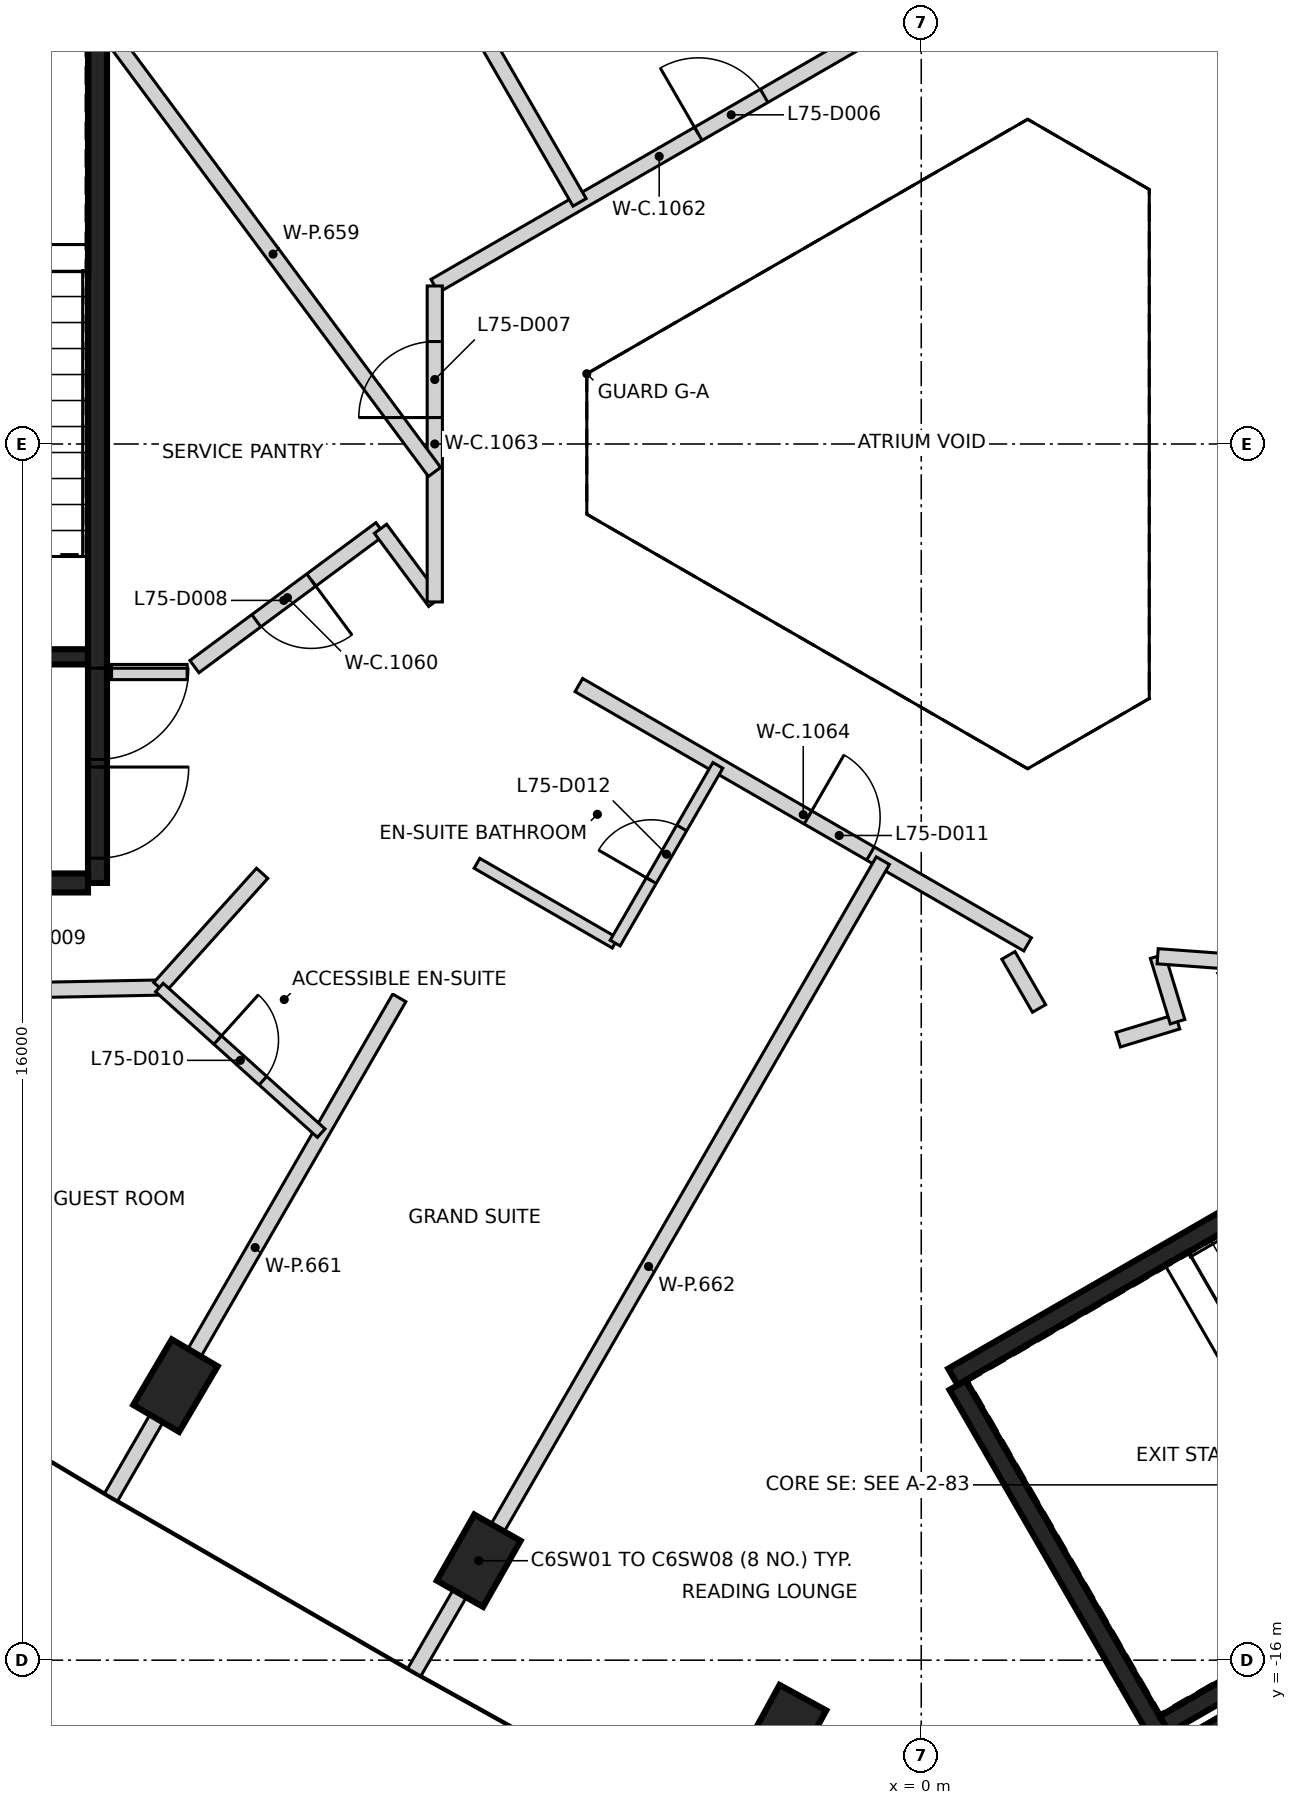
"""IFC4 building model, lengths in metres.
Left out: names, types, materials, properties, quantities, classifications, styles, units other than length and angle.
Written with IfcOpenShell. Run it as: python <this file> out.ifc"""

import sys

from ifc_helpers import new_model, si_unit, direction, frame, frame_2d, origin, origin_2d, place, context, subcontext, project, spatial, rectangle, extrude, element, fill, save


model = new_model("IFC4")
c1 = context("Model", 3, precision=1e-05, world=origin(), true_north=direction((0.0, 1.0)))
c2 = subcontext(c1, "Body", "Model", "MODEL_VIEW")
j1 = project(units=[si_unit("LENGTHUNIT", "METRE"), si_unit("PLANEANGLEUNIT", "RADIAN")], contexts=[c1])
p1 = place(None, origin())
s1 = spatial("IfcSite", under=j1, at=p1, CompositionType="ELEMENT")
p2 = place(p1, origin())
s2 = spatial("IfcBuilding", under=s1, at=p2, CompositionType="ELEMENT")
p3 = place(p2, frame((0.0, 0.0, 298.2)))
s3 = spatial("IfcBuildingStorey", under=s2, at=p3, CompositionType="ELEMENT", Elevation=298.2)
for number, where, z_axis, x_axis in (
    (1, (-9.812, -12.388, -0.35), (0.0, 0.0, 1.0), (0.507, 0.862, 0.0)),
    (2, (-5.822, -14.691, -0.35), (0.0, 0.0, 1.0), (0.493, 0.87, 0.0)),
    (3, (-1.797, -16.932, -0.35), (0.0, 0.0, 1.0), (0.479, 0.878, 0.0)),
):
    element("IfcColumn", number, at=place(p3, frame(where, z_axis=z_axis, x_axis=x_axis)), inside=s3, PredefinedType="COLUMN", context=c2, shape_type="SweptSolid", body=[
        extrude(rectangle(XDim=1.0, YDim=0.7, at=origin_2d()), origin(), (0.0, 0.0, 1.0), 2.64),
    ])
p4 = place(p3, frame((-10.837, 5.775, 0.0), z_axis=(0.0, 0.0, 1.0), x_axis=(0.0, -1.0, 0.0)))
e4 = element("IfcWall", 4, at=p4, inside=s3, PredefinedType="SHEAR", context=c2, shape_type="SweptSolid", body=[
    extrude(rectangle(XDim=11.55, YDim=0.25, at=frame_2d((5.775, 0.0))), origin(), (0.0, 0.0, 1.0), 3.2),
])
p5 = place(p4, frame((10.025, 0.0, 0.0)))
e5 = element("IfcOpeningElement", 5, at=p5, cuts=e4, PredefinedType="OPENING", context=c2, shape_type="SweptSolid", body=[
    extrude(rectangle(XDim=1.2, YDim=2.1, at=frame_2d((0.6, 1.05))), frame((0.0, 0.135, 0.0), z_axis=(0.0, -1.0, 0.0), x_axis=(1.0, 0.0, 0.0)), (0.0, 0.0, 1.0), 0.27),
])
p6 = place(p4, frame((8.725, 0.0, 0.0)))
e6 = element("IfcOpeningElement", 6, at=p6, cuts=e4, PredefinedType="OPENING", context=c2, shape_type="SweptSolid", body=[
    extrude(rectangle(XDim=1.2, YDim=2.1, at=frame_2d((0.6, 1.05))), frame((0.0, 0.135, 0.0), z_axis=(0.0, -1.0, 0.0), x_axis=(1.0, 0.0, 0.0)), (0.0, 0.0, 1.0), 0.27),
])
p7 = place(p3, frame((-10.963, -5.775, 0.0), z_axis=(0.0, 0.0, 1.0), x_axis=(-1.0, 0.0, 0.0)))
e7 = element("IfcWall", 7, at=p7, inside=s3, PredefinedType="SHEAR", context=c2, shape_type="SweptSolid", body=[
    extrude(rectangle(XDim=5.225, YDim=0.25, at=frame_2d((2.612, 0.0))), origin(), (0.0, 0.0, 1.0), 3.2),
])
p8 = place(p3, frame((-10.963, -2.8, 0.0), z_axis=(0.0, 0.0, 1.0), x_axis=(-1.0, 0.0, 0.0)))
e8 = element("IfcWall", 8, at=p8, inside=s3, PredefinedType="SHEAR", context=c2, shape_type="SweptSolid", body=[
    extrude(rectangle(XDim=5.098, YDim=0.2, at=frame_2d((2.549, 0.0))), origin(), (0.0, 0.0, 1.0), 3.2),
])
p9 = place(p8, frame((1.774, 0.0, 0.0)))
e9 = element("IfcOpeningElement", 9, at=p9, cuts=e8, PredefinedType="OPENING", context=c2, shape_type="SweptSolid", body=[
    extrude(rectangle(XDim=1.4, YDim=2.1, at=frame_2d((0.7, 1.05))), frame((0.0, 0.11, 0.0), z_axis=(0.0, -1.0, 0.0), x_axis=(1.0, 0.0, 0.0)), (0.0, 0.0, 1.0), 0.22),
])
p10 = place(p3, frame((0.417, -12.273, 0.0), z_axis=(0.0, 0.0, 1.0), x_axis=(0.866021906294, 0.500006057782, 0.0)))
e10 = element("IfcWall", 10, at=p10, inside=s3, PredefinedType="SHEAR", context=c2, shape_type="SweptSolid", body=[
    extrude(rectangle(XDim=11.55, YDim=0.25, at=frame_2d((5.775, 0.0))), origin(), (0.0, 0.0, 1.0), 3.2),
])
p11 = place(p10, frame((10.025, 0.0, 0.0)))
e11 = element("IfcOpeningElement", 11, at=p11, cuts=e10, PredefinedType="OPENING", context=c2, shape_type="SweptSolid", body=[
    extrude(rectangle(XDim=1.2, YDim=2.1, at=frame_2d((0.6, 1.05))), frame((0.0, 0.135, 0.0), z_axis=(0.0, -1.0, 0.0), x_axis=(1.0, 0.0, 0.0)), (0.0, 0.0, 1.0), 0.27),
])
p12 = place(p10, frame((8.725, 0.0, 0.0)))
e12 = element("IfcOpeningElement", 12, at=p12, cuts=e10, PredefinedType="OPENING", context=c2, shape_type="SweptSolid", body=[
    extrude(rectangle(XDim=1.2, YDim=2.1, at=frame_2d((0.6, 1.05))), frame((0.0, 0.135, 0.0), z_axis=(0.0, -1.0, 0.0), x_axis=(1.0, 0.0, 0.0)), (0.0, 0.0, 1.0), 0.27),
])
p13 = place(p3, frame((3.235, -17.153, 0.0), z_axis=(0.0, 0.0, 1.0), x_axis=(-0.500008851346, 0.866020293397, 0.0)))
e13 = element("IfcWall", 13, at=p13, inside=s3, PredefinedType="SHEAR", context=c2, shape_type="SweptSolid", body=[
    extrude(rectangle(XDim=5.51, YDim=0.25, at=frame_2d((2.755, 0.0))), origin(), (0.0, 0.0, 1.0), 3.2),
])
p14 = place(p3, frame((1.669, -18.19, 0.0), z_axis=(0.0, 0.0, 1.0), x_axis=(0.866042235819, 0.499970844928, 0.0)))
e14 = element("IfcWall", 14, at=p14, inside=s3, PredefinedType="SHEAR", context=c2, shape_type="SweptSolid", body=[
    extrude(rectangle(XDim=2.865, YDim=0.25, at=frame_2d((1.432, 0.0))), origin(), (0.0, 0.0, 1.0), 3.2),
])
p15 = place(p3, frame((5.431, -15.556, 0.0), z_axis=(0.0, 0.0, 1.0), x_axis=(-0.866022940537, -0.500004266446, 0.0)))
e15 = element("IfcWall", 15, at=p15, inside=s3, PredefinedType="SHEAR", context=c2, shape_type="SweptSolid", body=[
    extrude(rectangle(XDim=2.575, YDim=0.25, at=frame_2d((1.287, 0.0))), origin(), (0.0, 0.0, 1.0), 3.2),
])
p16 = place(p3, frame((-16.732, -7.282, 0.0), z_axis=(0.0, 0.0, 1.0), x_axis=(0.999809119854, 0.019537754635, 0.0)))
e16 = element("IfcWall", 16, at=p16, inside=s3, PredefinedType="PARTITIONING", context=c2, shape_type="SweptSolid", body=[
    extrude(rectangle(XDim=6.71, YDim=0.2, at=frame_2d((3.355, 0.0))), origin(), (0.0, 0.0, 1.0), 3.2),
])
p17 = place(p16, frame((3.451, 0.0, 0.0)))
e17 = element("IfcOpeningElement", 17, at=p17, cuts=e16, PredefinedType="OPENING", context=c2, shape_type="SweptSolid", body=[
    extrude(rectangle(XDim=1.0, YDim=2.1, at=frame_2d((0.5, 1.05))), frame((0.0, 0.11, 0.0), z_axis=(0.0, -1.0, 0.0), x_axis=(1.0, 0.0, 0.0)), (0.0, 0.0, 1.0), 0.22),
])
p18 = place(p3, frame((-10.652, -3.0, 0.0), z_axis=(0.0, 0.0, 1.0), x_axis=(1.0, 0.0, 0.0)))
e18 = element("IfcWall", 18, at=p18, inside=s3, PredefinedType="PARTITIONING", context=c2, shape_type="SweptSolid", body=[
    extrude(rectangle(XDim=0.994, YDim=0.2, at=frame_2d((0.497, 0.0))), origin(), (0.0, 0.0, 1.0), 3.2),
])
p19 = place(p3, frame((-10.023, -7.151, 0.0), z_axis=(0.0, 0.0, 1.0), x_axis=(0.668804583793, 0.743438248073, 0.0)))
e19 = element("IfcWall", 19, at=p19, inside=s3, PredefinedType="PARTITIONING", context=c2, shape_type="SweptSolid", body=[
    extrude(rectangle(XDim=2.021, YDim=0.2, at=frame_2d((1.011, 0.0))), origin(), (0.0, 0.0, 1.0), 3.2),
])
p20 = place(p3, frame((-7.115, -1.115, 0.0), z_axis=(0.0, 0.0, 1.0), x_axis=(-0.803344165632, -0.595515030495, 0.0)))
e20 = element("IfcWall", 20, at=p20, inside=s3, PredefinedType="PARTITIONING", context=c2, shape_type="SweptSolid", body=[
    extrude(rectangle(XDim=3.046, YDim=0.2, at=frame_2d((1.523, 0.0))), origin(), (0.0, 0.0, 1.0), 3.2),
])
p21 = place(p20, frame((1.133, 0.0, 0.0)))
e21 = element("IfcOpeningElement", 21, at=p21, cuts=e20, PredefinedType="OPENING", context=c2, shape_type="SweptSolid", body=[
    extrude(rectangle(XDim=0.9, YDim=2.1, at=frame_2d((0.45, 1.05))), frame((0.0, 0.11, 0.0), z_axis=(0.0, -1.0, 0.0), x_axis=(1.0, 0.0, 0.0)), (0.0, 0.0, 1.0), 0.22),
])
p22 = place(p3, frame((-7.114, -1.115, 0.0), z_axis=(0.0, 0.0, 1.0), x_axis=(0.595690139668, -0.803214328496, 0.0)))
e22 = element("IfcWall", 22, at=p22, inside=s3, PredefinedType="PARTITIONING", context=c2, shape_type="SweptSolid", body=[
    extrude(rectangle(XDim=1.199, YDim=0.2, at=frame_2d((0.599, 0.0))), origin(), (0.0, 0.0, 1.0), 3.2),
])
p23 = place(p3, frame((-6.4, 2.079, 0.0), z_axis=(0.0, 0.0, 1.0), x_axis=(0.866037708501, 0.499978687001, 0.0)))
e23 = element("IfcWall", 23, at=p23, inside=s3, PredefinedType="PARTITIONING", context=c2, shape_type="SweptSolid", body=[
    extrude(rectangle(XDim=6.818, YDim=0.2, at=frame_2d((3.409, 0.0))), origin(), (0.0, 0.0, 1.0), 3.2),
])
p24 = place(p23, frame((4.003, 0.0, 0.0)))
e24 = element("IfcOpeningElement", 24, at=p24, cuts=e23, PredefinedType="OPENING", context=c2, shape_type="SweptSolid", body=[
    extrude(rectangle(XDim=1.0, YDim=2.1, at=frame_2d((0.5, 1.05))), frame((0.0, 0.11, 0.0), z_axis=(0.0, -1.0, 0.0), x_axis=(1.0, 0.0, 0.0)), (0.0, 0.0, 1.0), 0.22),
])
p25 = place(p3, frame((-6.4, -2.078, 0.0), z_axis=(0.0, 0.0, 1.0), x_axis=(0.0, 1.0, 0.0)))
e25 = element("IfcWall", 25, at=p25, inside=s3, PredefinedType="PARTITIONING", context=c2, shape_type="SweptSolid", body=[
    extrude(rectangle(XDim=4.157, YDim=0.2, at=frame_2d((2.079, 0.0))), origin(), (0.0, 0.0, 1.0), 3.2),
])
p26 = place(p25, frame((2.426, 0.0, 0.0)))
e26 = element("IfcOpeningElement", 26, at=p26, cuts=e25, PredefinedType="OPENING", context=c2, shape_type="SweptSolid", body=[
    extrude(rectangle(XDim=1.0, YDim=2.1, at=frame_2d((0.5, 1.05))), frame((0.0, 0.11, 0.0), z_axis=(0.0, -1.0, 0.0), x_axis=(1.0, 0.0, 0.0)), (0.0, 0.0, 1.0), 0.22),
])
p27 = place(p3, frame((-4.505, -3.171, 0.0), z_axis=(0.0, 0.0, 1.0), x_axis=(0.865849219471, -0.500305036094, 0.0)))
e27 = element("IfcWall", 27, at=p27, inside=s3, PredefinedType="PARTITIONING", context=c2, shape_type="SweptSolid", body=[
    extrude(rectangle(XDim=6.819, YDim=0.2, at=frame_2d((3.41, 0.0))), origin(), (0.0, 0.0, 1.0), 3.2),
])
p28 = place(p27, frame((3.481, 0.0, 0.0)))
e28 = element("IfcOpeningElement", 28, at=p28, cuts=e27, PredefinedType="OPENING", context=c2, shape_type="SweptSolid", body=[
    extrude(rectangle(XDim=0.95, YDim=2.1, at=frame_2d((0.475, 1.05))), frame((0.0, 0.11, 0.0), z_axis=(0.0, -1.0, 0.0), x_axis=(1.0, 0.0, 0.0)), (0.0, 0.0, 1.0), 0.22),
])
p29 = place(p3, frame((1.147, -6.728, 0.0), z_axis=(0.0, 0.0, 1.0), x_axis=(0.500080775649, -0.865978762919, 0.0)))
e29 = element("IfcWall", 29, at=p29, inside=s3, PredefinedType="PARTITIONING", context=c2, shape_type="SweptSolid", body=[
    extrude(rectangle(XDim=0.806, YDim=0.2, at=frame_2d((0.403, 0.0))), origin(), (0.0, 0.0, 1.0), 3.2),
])
p30 = place(p3, frame((2.591, -7.837, 0.0), z_axis=(0.0, 0.0, 1.0), x_axis=(0.956974070788, 0.290173444409, 0.0)))
e30 = element("IfcWall", 30, at=p30, inside=s3, PredefinedType="PARTITIONING", context=c2, shape_type="SweptSolid", body=[
    extrude(rectangle(XDim=0.816, YDim=0.2, at=frame_2d((0.408, 0.0))), origin(), (0.0, 0.0, 1.0), 3.2),
])
p31 = place(p3, frame((3.11, -6.739, 0.0), z_axis=(0.0, 0.0, 1.0), x_axis=(0.291053676179, -0.95670672496, 0.0)))
e31 = element("IfcWall", 31, at=p31, inside=s3, PredefinedType="PARTITIONING", context=c2, shape_type="SweptSolid", body=[
    extrude(rectangle(XDim=0.9, YDim=0.2, at=frame_2d((0.45, 0.0))), origin(), (0.0, 0.0, 1.0), 3.2),
])
p32 = place(p3, frame((3.11, -6.739, 0.0), z_axis=(0.0, 0.0, 1.0), x_axis=(0.997306047238, -0.073352901386, 0.0)))
e32 = element("IfcWall", 32, at=p32, inside=s3, PredefinedType="PARTITIONING", context=c2, shape_type="SweptSolid", body=[
    extrude(rectangle(XDim=0.832, YDim=0.2, at=frame_2d((0.416, 0.0))), origin(), (0.0, 0.0, 1.0), 3.2),
])
p33 = place(p3, frame((-10.652, 5.364, 0.0), z_axis=(0.0, 0.0, 1.0), x_axis=(0.595550732464, -0.803317698711, 0.0)))
e33 = element("IfcWall", 33, at=p33, inside=s3, PredefinedType="PARTITIONING", context=c2, shape_type="SweptSolid", body=[
    extrude(rectangle(XDim=7.135, YDim=0.2, at=frame_2d((3.567, 0.0))), origin(), (0.0, 0.0, 1.0), 3.2),
])
p34 = place(p3, frame((-10.659, 13.856, 0.0), z_axis=(0.0, 0.0, 1.0), x_axis=(0.500004723409, -0.866022676706, 0.0)))
e34 = element("IfcWall", 34, at=p34, inside=s3, PredefinedType="PARTITIONING", context=c2, shape_type="SweptSolid", body=[
    extrude(rectangle(XDim=12.329, YDim=0.2, at=frame_2d((6.164, 0.0))), origin(), (0.0, 0.0, 1.0), 3.2),
])
p35 = place(p3, frame((-10.659, -13.856, 0.0), z_axis=(0.0, 0.0, 1.0), x_axis=(0.49995742368, 0.866049983839, 0.0)))
e35 = element("IfcWall", 35, at=p35, inside=s3, PredefinedType="PARTITIONING", context=c2, shape_type="SweptSolid", body=[
    extrude(rectangle(XDim=7.585, YDim=0.2, at=frame_2d((3.792, 0.0))), origin(), (0.0, 0.0, 1.0), 3.2),
])
p36 = place(p3, frame((-6.67, -16.159, 0.0), z_axis=(0.0, 0.0, 1.0), x_axis=(0.500017276951, 0.866015428702, 0.0)))
e36 = element("IfcWall", 36, at=p36, inside=s3, PredefinedType="PARTITIONING", context=c2, shape_type="SweptSolid", body=[
    extrude(rectangle(XDim=12.329, YDim=0.2, at=frame_2d((6.165, 0.0))), origin(), (0.0, 0.0, 1.0), 3.2),
])
p37 = place(p3, frame((-10.023, -7.151, 0.0), z_axis=(0.0, 0.0, 1.0), x_axis=(0.743463699468, -0.668776291127, 0.0)))
e37 = element("IfcWall", 37, at=p37, inside=s3, PredefinedType="PARTITIONING", context=c2, shape_type="SweptSolid", body=[
    extrude(rectangle(XDim=2.864, YDim=0.15, at=frame_2d((1.432, 0.0))), origin(), (0.0, 0.0, 1.0), 3.2),
])
p38 = place(p37, frame((1.032, 0.0, 0.0)))
e38 = element("IfcOpeningElement", 38, at=p38, cuts=e37, PredefinedType="OPENING", context=c2, shape_type="SweptSolid", body=[
    extrude(rectangle(XDim=0.8, YDim=2.1, at=frame_2d((0.4, 1.05))), frame((0.0, 0.085, 0.0), z_axis=(0.0, -1.0, 0.0), x_axis=(1.0, 0.0, 0.0)), (0.0, 0.0, 1.0), 0.17),
])
p39 = place(p3, frame((-5.845, -5.516, 0.0), z_axis=(0.0, 0.0, 1.0), x_axis=(0.865972526687, -0.500091574638, 0.0)))
e39 = element("IfcWall", 39, at=p39, inside=s3, PredefinedType="PARTITIONING", context=c2, shape_type="SweptSolid", body=[
    extrude(rectangle(XDim=2.099, YDim=0.15, at=frame_2d((1.05, 0.0))), origin(), (0.0, 0.0, 1.0), 3.2),
])
p40 = place(p3, frame((-4.027, -6.566, 0.0), z_axis=(0.0, 0.0, 1.0), x_axis=(0.500358939419, 0.865818070812, 0.0)))
e40 = element("IfcWall", 40, at=p40, inside=s3, PredefinedType="PARTITIONING", context=c2, shape_type="SweptSolid", body=[
    extrude(rectangle(XDim=2.7, YDim=0.15, at=frame_2d((1.35, 0.0))), origin(), (0.0, 0.0, 1.0), 3.2),
])
p41 = place(p40, frame((0.95, 0.0, 0.0)))
e41 = element("IfcOpeningElement", 41, at=p41, cuts=e40, PredefinedType="OPENING", context=c2, shape_type="SweptSolid", body=[
    extrude(rectangle(XDim=0.8, YDim=2.1, at=frame_2d((0.4, 1.05))), frame((0.0, 0.085, 0.0), z_axis=(0.0, -1.0, 0.0), x_axis=(1.0, 0.0, 0.0)), (0.0, 0.0, 1.0), 0.17),
])
p42 = place(p5, origin())
e42 = element("IfcDoor", 42, at=p42, inside=s3, OperationType="SINGLE_SWING_LEFT", PredefinedType="DOOR", context=c2, shape_type="SweptSolid", body=[
    extrude(rectangle(XDim=1.2, YDim=2.1, at=frame_2d((0.6, 1.05))), frame((0.0, 0.025, 0.0), z_axis=(0.0, -1.0, 0.0), x_axis=(1.0, 0.0, 0.0)), (0.0, 0.0, 1.0), 0.05),
])
fill(e5, e42)
p43 = place(p6, origin())
e43 = element("IfcDoor", 43, at=p43, inside=s3, OperationType="SINGLE_SWING_RIGHT", PredefinedType="DOOR", context=c2, shape_type="SweptSolid", body=[
    extrude(rectangle(XDim=1.2, YDim=2.1, at=frame_2d((0.6, 1.05))), frame((0.0, 0.025, 0.0), z_axis=(0.0, -1.0, 0.0), x_axis=(1.0, 0.0, 0.0)), (0.0, 0.0, 1.0), 0.05),
])
fill(e6, e43)
p44 = place(p24, origin())
e44 = element("IfcDoor", 44, at=p44, inside=s3, OperationType="SINGLE_SWING_LEFT", PredefinedType="DOOR", context=c2, shape_type="SweptSolid", body=[
    extrude(rectangle(XDim=1.0, YDim=2.1, at=frame_2d((0.5, 1.05))), frame((0.0, 0.025, 0.0), z_axis=(0.0, -1.0, 0.0), x_axis=(1.0, 0.0, 0.0)), (0.0, 0.0, 1.0), 0.05),
])
fill(e24, e44)
p45 = place(p26, origin())
e45 = element("IfcDoor", 45, at=p45, inside=s3, OperationType="SINGLE_SWING_LEFT", PredefinedType="DOOR", context=c2, shape_type="SweptSolid", body=[
    extrude(rectangle(XDim=1.0, YDim=2.1, at=frame_2d((0.5, 1.05))), frame((0.0, 0.025, 0.0), z_axis=(0.0, -1.0, 0.0), x_axis=(1.0, 0.0, 0.0)), (0.0, 0.0, 1.0), 0.05),
])
fill(e26, e45)
p46 = place(p21, origin())
e46 = element("IfcDoor", 46, at=p46, inside=s3, OperationType="SINGLE_SWING_LEFT", PredefinedType="DOOR", context=c2, shape_type="SweptSolid", body=[
    extrude(rectangle(XDim=0.9, YDim=2.1, at=frame_2d((0.45, 1.05))), frame((0.0, 0.025, 0.0), z_axis=(0.0, -1.0, 0.0), x_axis=(1.0, 0.0, 0.0)), (0.0, 0.0, 1.0), 0.05),
])
fill(e21, e46)
p47 = place(p38, frame((0.8, 0.0, 0.0), z_axis=(0.0, 0.0, 1.0), x_axis=(-1.0, 0.0, 0.0)))
e47 = element("IfcDoor", 47, at=p47, inside=s3, OperationType="SINGLE_SWING_LEFT", PredefinedType="DOOR", context=c2, shape_type="SweptSolid", body=[
    extrude(rectangle(XDim=0.8, YDim=2.1, at=frame_2d((0.4, 1.05))), frame((0.0, 0.025, 0.0), z_axis=(0.0, -1.0, 0.0), x_axis=(1.0, 0.0, 0.0)), (0.0, 0.0, 1.0), 0.05),
])
fill(e38, e47)
p48 = place(p28, frame((0.95, 0.0, 0.0), z_axis=(0.0, 0.0, 1.0), x_axis=(-1.0, 0.0, 0.0)))
e48 = element("IfcDoor", 48, at=p48, inside=s3, OperationType="SINGLE_SWING_LEFT", PredefinedType="DOOR", context=c2, shape_type="SweptSolid", body=[
    extrude(rectangle(XDim=0.95, YDim=2.1, at=frame_2d((0.475, 1.05))), frame((0.0, 0.025, 0.0), z_axis=(0.0, -1.0, 0.0), x_axis=(1.0, 0.0, 0.0)), (0.0, 0.0, 1.0), 0.05),
])
fill(e28, e48)
p49 = place(p41, frame((0.8, 0.0, 0.0), z_axis=(0.0, 0.0, 1.0), x_axis=(-1.0, 0.0, 0.0)))
e49 = element("IfcDoor", 49, at=p49, inside=s3, OperationType="SINGLE_SWING_LEFT", PredefinedType="DOOR", context=c2, shape_type="SweptSolid", body=[
    extrude(rectangle(XDim=0.8, YDim=2.1, at=frame_2d((0.4, 1.05))), frame((0.0, 0.025, 0.0), z_axis=(0.0, -1.0, 0.0), x_axis=(1.0, 0.0, 0.0)), (0.0, 0.0, 1.0), 0.05),
])
fill(e41, e49)
save(model, sys.argv[1])
